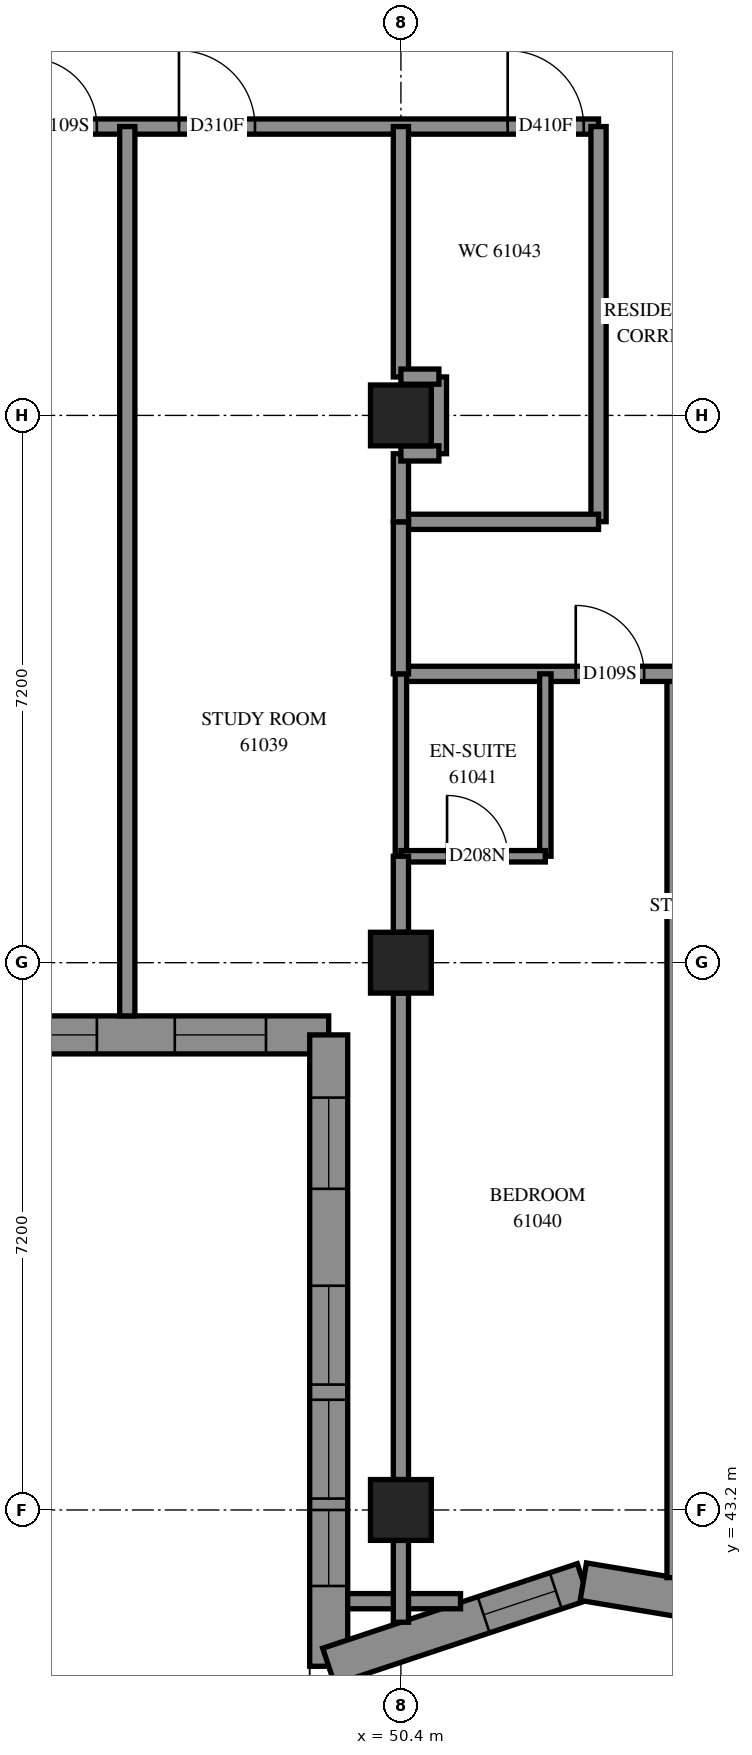
"""IFC4 building model, lengths in metres.
Left out: names, types, materials, properties, quantities, classifications, styles, units other than length and angle.
Written with IfcOpenShell. Run it as: python <this file> out.ifc"""

import sys

from ifc_helpers import new_model, si_unit, direction, frame, frame_2d, origin, origin_2d, place, context, subcontext, project, spatial, polyline, rectangle, outline, extrude, element, fill, save


model = new_model("IFC4")
c1 = context("Model", 3, precision=1e-05, world=origin(), true_north=direction((0.0, 1.0)))
c2 = subcontext(c1, "Body", "Model", "MODEL_VIEW")
j1 = project(units=[si_unit("LENGTHUNIT", "METRE"), si_unit("PLANEANGLEUNIT", "RADIAN")], contexts=[c1])
p1 = place(None, origin())
s1 = spatial("IfcSite", under=j1, at=p1, CompositionType="ELEMENT")
p2 = place(p1, origin())
s2 = spatial("IfcBuilding", under=s1, at=p2, CompositionType="ELEMENT")
p3 = place(p2, frame((0.0, 0.0, 223.6)))
s3 = spatial("IfcBuildingStorey", under=s2, at=p3, CompositionType="ELEMENT", Elevation=223.6)
for number, where, z_axis, x_axis in (
    (1, (50.4, 43.2, 0.0), (0.0, 0.0, 1.0), (1.0, 0.0, 0.0)),
    (2, (50.4, 50.4, 0.0), (0.0, 0.0, 1.0), (1.0, 0.0, 0.0)),
    (3, (50.4, 57.6, 0.0), (0.0, 0.0, 1.0), (1.0, 0.0, 0.0)),
):
    element("IfcColumn", number, at=place(p3, frame(where, z_axis=z_axis, x_axis=x_axis)), inside=s3, PredefinedType="COLUMN", context=c2, shape_type="SweptSolid", body=[
        extrude(rectangle(XDim=0.8, YDim=0.8, at=origin_2d()), origin(), (0.0, 0.0, 1.0), 3.1),
    ])
p4 = place(p3, frame((42.25, 49.45, 0.0), z_axis=(0.0, 0.0, 1.0), x_axis=(1.0, 0.0, 0.0)))
e4 = element("IfcWall", 4, at=p4, inside=s3, PredefinedType="SOLIDWALL", context=c2, shape_type="SweptSolid", body=[
    extrude(outline(polyline([(-0.25, -0.25), (6.95, -0.25), (7.45, 0.25), (0.25, 0.25), (-0.25, -0.25)])), origin(), (0.0, 0.0, 1.0), 3.1),
])
p5 = place(p4, frame((1.35, 0.0, 0.45)))
e5 = element("IfcOpeningElement", 5, at=p5, cuts=e4, PredefinedType="OPENING", context=c2, shape_type="SweptSolid", body=[
    extrude(rectangle(XDim=1.3, YDim=2.5, at=frame_2d((0.65, 1.25))), frame((0.0, 0.26, 0.0), z_axis=(0.0, -1.0, 0.0), x_axis=(1.0, 0.0, 0.0)), (0.0, 0.0, 1.0), 0.52),
])
p6 = place(p4, frame((2.85, 0.0, 0.45)))
e6 = element("IfcOpeningElement", 6, at=p6, cuts=e4, PredefinedType="OPENING", context=c2, shape_type="SweptSolid", body=[
    extrude(rectangle(XDim=1.3, YDim=2.5, at=frame_2d((0.65, 1.25))), frame((0.0, 0.26, 0.0), z_axis=(0.0, -1.0, 0.0), x_axis=(1.0, 0.0, 0.0)), (0.0, 0.0, 1.0), 0.52),
])
p7 = place(p4, frame((5.175, 0.0, 0.45)))
e7 = element("IfcOpeningElement", 7, at=p7, cuts=e4, PredefinedType="OPENING", context=c2, shape_type="SweptSolid", body=[
    extrude(rectangle(XDim=1.2, YDim=2.5, at=frame_2d((0.6, 1.25))), frame((0.0, 0.26, 0.0), z_axis=(0.0, -1.0, 0.0), x_axis=(1.0, 0.0, 0.0)), (0.0, 0.0, 1.0), 0.52),
])
p8 = place(p3, frame((49.45, 49.45, 0.0), z_axis=(0.0, 0.0, 1.0), x_axis=(0.0, -1.0, 0.0)))
e8 = element("IfcWall", 8, at=p8, inside=s3, PredefinedType="SOLIDWALL", context=c2, shape_type="SweptSolid", body=[
    extrude(outline(polyline([(0.25, -0.25), (8.653, -0.25), (7.96, 0.25), (-0.25, 0.25), (0.25, -0.25)])), origin(), (0.0, 0.0, 1.0), 3.1),
])
p9 = place(p8, frame((3.3, 0.0, 0.45)))
e9 = element("IfcOpeningElement", 9, at=p9, cuts=e8, PredefinedType="OPENING", context=c2, shape_type="SweptSolid", body=[
    extrude(rectangle(XDim=1.3, YDim=2.5, at=frame_2d((0.65, 1.25))), frame((0.0, 0.26, 0.0), z_axis=(0.0, -1.0, 0.0), x_axis=(1.0, 0.0, 0.0)), (0.0, 0.0, 1.0), 0.52),
])
p10 = place(p8, frame((4.8, 0.0, 0.45)))
e10 = element("IfcOpeningElement", 10, at=p10, cuts=e8, PredefinedType="OPENING", context=c2, shape_type="SweptSolid", body=[
    extrude(rectangle(XDim=1.3, YDim=2.5, at=frame_2d((0.65, 1.25))), frame((0.0, 0.26, 0.0), z_axis=(0.0, -1.0, 0.0), x_axis=(1.0, 0.0, 0.0)), (0.0, 0.0, 1.0), 0.52),
])
p11 = place(p8, frame((0.825, 0.0, 0.45)))
e11 = element("IfcOpeningElement", 11, at=p11, cuts=e8, PredefinedType="OPENING", context=c2, shape_type="SweptSolid", body=[
    extrude(rectangle(XDim=1.2, YDim=2.5, at=frame_2d((0.6, 1.25))), frame((0.0, 0.26, 0.0), z_axis=(0.0, -1.0, 0.0), x_axis=(1.0, 0.0, 0.0)), (0.0, 0.0, 1.0), 0.52),
])
p12 = place(p8, frame((6.25, 0.0, 0.45)))
e12 = element("IfcOpeningElement", 12, at=p12, cuts=e8, PredefinedType="OPENING", context=c2, shape_type="SweptSolid", body=[
    extrude(rectangle(XDim=1.0, YDim=2.5, at=frame_2d((0.5, 1.25))), frame((0.0, 0.26, 0.0), z_axis=(0.0, -1.0, 0.0), x_axis=(1.0, 0.0, 0.0)), (0.0, 0.0, 1.0), 0.52),
])
p13 = place(p3, frame((49.45, 41.144, 0.0), z_axis=(0.0, 0.0, 1.0), x_axis=(0.9489633816, 0.3153862716, 0.0)))
e13 = element("IfcWall", 13, at=p13, inside=s3, PredefinedType="SOLIDWALL", context=c2, shape_type="SweptSolid", body=[
    extrude(outline(polyline([(-0.346, -0.25), (3.468, -0.25), (3.592, 0.25), (0.346, 0.25), (-0.346, -0.25)])), origin(), (0.0, 0.0, 1.0), 3.1),
])
p14 = place(p13, frame((2.148, 0.0, 0.45)))
e14 = element("IfcOpeningElement", 14, at=p14, cuts=e13, PredefinedType="OPENING", context=c2, shape_type="SweptSolid", body=[
    extrude(rectangle(XDim=1.0, YDim=2.5, at=frame_2d((0.5, 1.25))), frame((0.0, 0.26, 0.0), z_axis=(0.0, -1.0, 0.0), x_axis=(1.0, 0.0, 0.0)), (0.0, 0.0, 1.0), 0.52),
])
p15 = place(p3, frame((52.8, 42.257, 0.0), z_axis=(0.0, 0.0, 1.0), x_axis=(0.986404908, -0.1643330686, 0.0)))
e15 = element("IfcWall", 15, at=p15, inside=s3, PredefinedType="SOLIDWALL", context=c2, shape_type="SweptSolid", body=[
    extrude(outline(polyline([(0.062, -0.25), (3.732, -0.25), (3.648, 0.25), (-0.062, 0.25), (0.062, -0.25)])), origin(), (0.0, 0.0, 1.0), 3.1),
])
p16 = place(p15, frame((1.733, 0.0, 0.45)))
e16 = element("IfcOpeningElement", 16, at=p16, cuts=e15, PredefinedType="OPENING", context=c2, shape_type="SweptSolid", body=[
    extrude(rectangle(XDim=1.2, YDim=2.5, at=frame_2d((0.6, 1.25))), frame((0.0, 0.26, 0.0), z_axis=(0.0, -1.0, 0.0), x_axis=(1.0, 0.0, 0.0)), (0.0, 0.0, 1.0), 0.52),
])
p17 = place(p3, frame((36.0, 61.4, 0.0), z_axis=(0.0, 0.0, 1.0), x_axis=(1.0, 0.0, 0.0)))
e17 = element("IfcWall", 17, at=p17, inside=s3, PredefinedType="PARTITIONING", context=c2, shape_type="SweptSolid", body=[
    extrude(rectangle(XDim=17.0, YDim=0.2, at=frame_2d((8.5, 0.0))), origin(), (0.0, 0.0, 1.0), 3.1),
])
p18 = place(p17, frame((2.3, 0.0, 0.0)))
e18 = element("IfcOpeningElement", 18, at=p18, cuts=e17, PredefinedType="OPENING", context=c2, shape_type="SweptSolid", body=[
    extrude(rectangle(XDim=0.9, YDim=2.1, at=frame_2d((0.45, 1.05))), frame((0.0, 0.11, 0.0), z_axis=(0.0, -1.0, 0.0), x_axis=(1.0, 0.0, 0.0)), (0.0, 0.0, 1.0), 0.22),
])
p19 = place(p17, frame((4.125, 0.0, 0.0)))
e19 = element("IfcOpeningElement", 19, at=p19, cuts=e17, PredefinedType="OPENING", context=c2, shape_type="SweptSolid", body=[
    extrude(rectangle(XDim=1.0, YDim=2.1, at=frame_2d((0.5, 1.05))), frame((0.0, 0.11, 0.0), z_axis=(0.0, -1.0, 0.0), x_axis=(1.0, 0.0, 0.0)), (0.0, 0.0, 1.0), 0.22),
])
p20 = place(p17, frame((9.5, 0.0, 0.0)))
e20 = element("IfcOpeningElement", 20, at=p20, cuts=e17, PredefinedType="OPENING", context=c2, shape_type="SweptSolid", body=[
    extrude(rectangle(XDim=0.9, YDim=2.1, at=frame_2d((0.45, 1.05))), frame((0.0, 0.11, 0.0), z_axis=(0.0, -1.0, 0.0), x_axis=(1.0, 0.0, 0.0)), (0.0, 0.0, 1.0), 0.22),
])
p21 = place(p17, frame((11.48, 0.0, 0.0)))
e21 = element("IfcOpeningElement", 21, at=p21, cuts=e17, PredefinedType="OPENING", context=c2, shape_type="SweptSolid", body=[
    extrude(rectangle(XDim=1.0, YDim=2.1, at=frame_2d((0.5, 1.05))), frame((0.0, 0.11, 0.0), z_axis=(0.0, -1.0, 0.0), x_axis=(1.0, 0.0, 0.0)), (0.0, 0.0, 1.0), 0.22),
])
p22 = place(p17, frame((15.805, 0.0, 0.0)))
e22 = element("IfcOpeningElement", 22, at=p22, cuts=e17, PredefinedType="OPENING", context=c2, shape_type="SweptSolid", body=[
    extrude(rectangle(XDim=1.0, YDim=2.1, at=frame_2d((0.5, 1.05))), frame((0.0, 0.11, 0.0), z_axis=(0.0, -1.0, 0.0), x_axis=(1.0, 0.0, 0.0)), (0.0, 0.0, 1.0), 0.22),
])
p23 = place(p3, frame((54.0, 42.31, 0.0), z_axis=(0.0, 0.0, 1.0), x_axis=(0.0, 1.0, 0.0)))
e23 = element("IfcWall", 23, at=p23, inside=s3, PredefinedType="PARTITIONING", context=c2, shape_type="SweptSolid", body=[
    extrude(rectangle(XDim=11.89, YDim=0.2, at=frame_2d((5.945, 0.0))), origin(), (0.0, 0.0, 1.0), 3.1),
])
p24 = place(p3, frame((46.8, 49.7, 0.0), z_axis=(0.0, 0.0, 1.0), x_axis=(0.0, 1.0, 0.0)))
e24 = element("IfcWall", 24, at=p24, inside=s3, PredefinedType="PARTITIONING", context=c2, shape_type="SweptSolid", body=[
    extrude(rectangle(XDim=11.7, YDim=0.2, at=frame_2d((5.85, 0.0))), origin(), (0.0, 0.0, 1.0), 3.1),
])
p25 = place(p3, frame((50.4, 43.6, 0.0), z_axis=(0.0, 0.0, 1.0), x_axis=(0.0, 1.0, 0.0)))
e25 = element("IfcWall", 25, at=p25, inside=s3, PredefinedType="PARTITIONING", context=c2, shape_type="SweptSolid", body=[
    extrude(rectangle(XDim=6.4, YDim=0.2, at=frame_2d((3.2, 0.0))), origin(), (0.0, 0.0, 1.0), 2.6),
])
p26 = place(p3, frame((53.0, 56.202, 0.0), z_axis=(0.0, 0.0, 1.0), x_axis=(0.0, 1.0, 0.0)))
e26 = element("IfcWall", 26, at=p26, inside=s3, PredefinedType="PARTITIONING", context=c2, shape_type="SweptSolid", body=[
    extrude(rectangle(XDim=5.198, YDim=0.2, at=frame_2d((2.599, 0.0))), origin(), (0.0, 0.0, 1.0), 3.1),
])
p27 = place(p3, frame((50.4, 54.2, 0.0), z_axis=(0.0, 0.0, 1.0), x_axis=(1.0, 0.0, 0.0)))
e27 = element("IfcWall", 27, at=p27, inside=s3, PredefinedType="PARTITIONING", context=c2, shape_type="SweptSolid", body=[
    extrude(rectangle(XDim=4.6, YDim=0.2, at=frame_2d((2.3, 0.0))), origin(), (0.0, 0.0, 1.0), 3.1),
])
p28 = place(p27, frame((2.3, 0.0, 0.0)))
e28 = element("IfcOpeningElement", 28, at=p28, cuts=e27, PredefinedType="OPENING", context=c2, shape_type="SweptSolid", body=[
    extrude(rectangle(XDim=0.9, YDim=2.1, at=frame_2d((0.45, 1.05))), frame((0.0, 0.11, 0.0), z_axis=(0.0, -1.0, 0.0), x_axis=(1.0, 0.0, 0.0)), (0.0, 0.0, 1.0), 0.22),
])
p29 = place(p3, frame((50.4, 58.106, 0.0), z_axis=(0.0, 0.0, 1.0), x_axis=(0.0, 1.0, 0.0)))
e29 = element("IfcWall", 29, at=p29, inside=s3, PredefinedType="PARTITIONING", context=c2, shape_type="SweptSolid", body=[
    extrude(rectangle(XDim=3.294, YDim=0.2, at=frame_2d((1.647, 0.0))), origin(), (0.0, 0.0, 1.0), 3.1),
])
p30 = place(p3, frame((50.4, 56.2, 0.0), z_axis=(0.0, 0.0, 1.0), x_axis=(1.0, 0.0, 0.0)))
e30 = element("IfcWall", 30, at=p30, inside=s3, PredefinedType="PARTITIONING", context=c2, shape_type="SweptSolid", body=[
    extrude(rectangle(XDim=2.6, YDim=0.2, at=frame_2d((1.3, 0.0))), origin(), (0.0, 0.0, 1.0), 3.1),
])
for number, where, z_axis, x_axis in (
    (31, (52.3, 51.8, 0.0), (0.0, 0.0, 1.0), (0.0, 1.0, 0.0)),
    (32, (50.4, 51.8, 0.0), (0.0, 0.0, 1.0), (0.0, 1.0, 0.0)),
):
    element("IfcWall", number, at=place(p3, frame(where, z_axis=z_axis, x_axis=x_axis)), inside=s3, PredefinedType="PARTITIONING", context=c2, shape_type="SweptSolid", body=[
        extrude(rectangle(XDim=2.4, YDim=0.15, at=frame_2d((1.2, 0.0))), origin(), (0.0, 0.0, 1.0), 3.1),
    ])
p31 = place(p3, frame((50.4, 54.2, 0.0), z_axis=(0.0, 0.0, 1.0), x_axis=(0.0, 1.0, 0.0)))
e33 = element("IfcWall", 33, at=p31, inside=s3, PredefinedType="PARTITIONING", context=c2, shape_type="SweptSolid", body=[
    extrude(rectangle(XDim=2.0, YDim=0.2, at=frame_2d((1.0, 0.0))), origin(), (0.0, 0.0, 1.0), 3.1),
])
p32 = place(p3, frame((50.4, 51.8, 0.0), z_axis=(0.0, 0.0, 1.0), x_axis=(1.0, 0.0, 0.0)))
e34 = element("IfcWall", 34, at=p32, inside=s3, PredefinedType="PARTITIONING", context=c2, shape_type="SweptSolid", body=[
    extrude(rectangle(XDim=1.9, YDim=0.15, at=frame_2d((0.95, 0.0))), origin(), (0.0, 0.0, 1.0), 3.1),
])
p33 = place(p32, frame((0.607, 0.0, 0.0)))
e35 = element("IfcOpeningElement", 35, at=p33, cuts=e34, PredefinedType="OPENING", context=c2, shape_type="SweptSolid", body=[
    extrude(rectangle(XDim=0.8, YDim=2.1, at=frame_2d((0.4, 1.05))), frame((0.0, 0.085, 0.0), z_axis=(0.0, -1.0, 0.0), x_axis=(1.0, 0.0, 0.0)), (0.0, 0.0, 1.0), 0.17),
])
p34 = place(p3, frame((49.7, 42.0, 0.0), z_axis=(0.0, 0.0, 1.0), x_axis=(1.0, 0.0, 0.0)))
e36 = element("IfcWall", 36, at=p34, inside=s3, PredefinedType="PARTITIONING", context=c2, shape_type="SweptSolid", body=[
    extrude(rectangle(XDim=1.484, YDim=0.2, at=frame_2d((0.742, 0.0))), origin(), (0.0, 0.0, 1.0), 3.1),
])
p35 = place(p3, frame((50.9, 57.096, 0.0), z_axis=(0.0, 0.0, 1.0), x_axis=(0.0, 1.0, 0.0)))
e37 = element("IfcWall", 37, at=p35, inside=s3, PredefinedType="PARTITIONING", context=c2, shape_type="SweptSolid", body=[
    extrude(rectangle(XDim=1.01, YDim=0.2, at=frame_2d((0.505, 0.0))), origin(), (0.0, 0.0, 1.0), 3.1),
])
p36 = place(p3, frame((50.4, 50.8, 0.0), z_axis=(0.0, 0.0, 1.0), x_axis=(0.0, 1.0, 0.0)))
e38 = element("IfcWall", 38, at=p36, inside=s3, PredefinedType="PARTITIONING", context=c2, shape_type="SweptSolid", body=[
    extrude(rectangle(XDim=1.0, YDim=0.2, at=frame_2d((0.5, 0.0))), origin(), (0.0, 0.0, 1.0), 3.1),
])
p37 = place(p3, frame((50.4, 56.2, 0.0), z_axis=(0.0, 0.0, 1.0), x_axis=(0.0, 1.0, 0.0)))
e39 = element("IfcWall", 39, at=p37, inside=s3, PredefinedType="PARTITIONING", context=c2, shape_type="SweptSolid", body=[
    extrude(rectangle(XDim=0.896, YDim=0.2, at=frame_2d((0.448, 0.0))), origin(), (0.0, 0.0, 1.0), 3.1),
])
p38 = place(p3, frame((50.4, 41.723, 0.0), z_axis=(0.0, 0.0, 1.0), x_axis=(0.0, 1.0, 0.0)))
e40 = element("IfcWall", 40, at=p38, inside=s3, PredefinedType="PARTITIONING", context=c2, shape_type="SweptSolid", body=[
    extrude(rectangle(XDim=1.077, YDim=0.2, at=frame_2d((0.539, 0.0))), origin(), (0.0, 0.0, 1.0), 3.1),
])
for number, where, z_axis, x_axis in (
    (41, (50.4, 58.11, 0.0), (0.0, 0.0, 1.0), (1.0, 0.0, 0.0)),
    (42, (50.4, 57.1, 0.0), (0.0, 0.0, 1.0), (1.0, 0.0, 0.0)),
):
    element("IfcWall", number, at=place(p3, frame(where, z_axis=z_axis, x_axis=x_axis)), inside=s3, PredefinedType="PARTITIONING", context=c2, shape_type="SweptSolid", body=[
        extrude(rectangle(XDim=0.5, YDim=0.2, at=frame_2d((0.25, 0.0))), origin(), (0.0, 0.0, 1.0), 3.1),
    ])
p39 = place(p6, origin())
e43 = element("IfcWindow", 43, at=p39, inside=s3, PartitioningType="SINGLE_PANEL", PredefinedType="WINDOW", context=c2, shape_type="SweptSolid", body=[
    extrude(rectangle(XDim=1.3, YDim=2.5, at=frame_2d((0.65, 1.25))), frame((0.0, 0.18, 0.0), z_axis=(0.0, -1.0, 0.0), x_axis=(1.0, 0.0, 0.0)), (0.0, 0.0, 1.0), 0.06),
])
fill(e6, e43)
p40 = place(p7, origin())
e44 = element("IfcWindow", 44, at=p40, inside=s3, PartitioningType="SINGLE_PANEL", PredefinedType="WINDOW", context=c2, shape_type="SweptSolid", body=[
    extrude(rectangle(XDim=1.2, YDim=2.5, at=frame_2d((0.6, 1.25))), frame((0.0, 0.18, 0.0), z_axis=(0.0, -1.0, 0.0), x_axis=(1.0, 0.0, 0.0)), (0.0, 0.0, 1.0), 0.06),
])
fill(e7, e44)
p41 = place(p9, origin())
e45 = element("IfcWindow", 45, at=p41, inside=s3, PartitioningType="SINGLE_PANEL", PredefinedType="WINDOW", context=c2, shape_type="SweptSolid", body=[
    extrude(rectangle(XDim=1.3, YDim=2.5, at=frame_2d((0.65, 1.25))), frame((0.0, 0.18, 0.0), z_axis=(0.0, -1.0, 0.0), x_axis=(1.0, 0.0, 0.0)), (0.0, 0.0, 1.0), 0.06),
])
fill(e9, e45)
p42 = place(p10, origin())
e46 = element("IfcWindow", 46, at=p42, inside=s3, PartitioningType="SINGLE_PANEL", PredefinedType="WINDOW", context=c2, shape_type="SweptSolid", body=[
    extrude(rectangle(XDim=1.3, YDim=2.5, at=frame_2d((0.65, 1.25))), frame((0.0, 0.18, 0.0), z_axis=(0.0, -1.0, 0.0), x_axis=(1.0, 0.0, 0.0)), (0.0, 0.0, 1.0), 0.06),
])
fill(e10, e46)
p43 = place(p11, origin())
e47 = element("IfcWindow", 47, at=p43, inside=s3, PartitioningType="SINGLE_PANEL", PredefinedType="WINDOW", context=c2, shape_type="SweptSolid", body=[
    extrude(rectangle(XDim=1.2, YDim=2.5, at=frame_2d((0.6, 1.25))), frame((0.0, 0.18, 0.0), z_axis=(0.0, -1.0, 0.0), x_axis=(1.0, 0.0, 0.0)), (0.0, 0.0, 1.0), 0.06),
])
fill(e11, e47)
p44 = place(p20, origin())
e48 = element("IfcDoor", 48, at=p44, inside=s3, OperationType="SINGLE_SWING_LEFT", PredefinedType="DOOR", context=c2, shape_type="SweptSolid", body=[
    extrude(rectangle(XDim=0.9, YDim=2.1, at=frame_2d((0.45, 1.05))), frame((0.0, 0.025, 0.0), z_axis=(0.0, -1.0, 0.0), x_axis=(1.0, 0.0, 0.0)), (0.0, 0.0, 1.0), 0.05),
])
fill(e20, e48)
p45 = place(p21, origin())
e49 = element("IfcDoor", 49, at=p45, inside=s3, OperationType="SINGLE_SWING_RIGHT", PredefinedType="DOOR", context=c2, shape_type="SweptSolid", body=[
    extrude(rectangle(XDim=1.0, YDim=2.1, at=frame_2d((0.5, 1.05))), frame((0.0, 0.025, 0.0), z_axis=(0.0, -1.0, 0.0), x_axis=(1.0, 0.0, 0.0)), (0.0, 0.0, 1.0), 0.05),
])
fill(e21, e49)
p46 = place(p28, origin())
e50 = element("IfcDoor", 50, at=p46, inside=s3, OperationType="SINGLE_SWING_LEFT", PredefinedType="DOOR", context=c2, shape_type="SweptSolid", body=[
    extrude(rectangle(XDim=0.9, YDim=2.1, at=frame_2d((0.45, 1.05))), frame((0.0, 0.025, 0.0), z_axis=(0.0, -1.0, 0.0), x_axis=(1.0, 0.0, 0.0)), (0.0, 0.0, 1.0), 0.05),
])
fill(e28, e50)
p47 = place(p33, origin())
e51 = element("IfcDoor", 51, at=p47, inside=s3, OperationType="SINGLE_SWING_RIGHT", PredefinedType="DOOR", context=c2, shape_type="SweptSolid", body=[
    extrude(rectangle(XDim=0.8, YDim=2.1, at=frame_2d((0.4, 1.05))), frame((0.0, 0.025, 0.0), z_axis=(0.0, -1.0, 0.0), x_axis=(1.0, 0.0, 0.0)), (0.0, 0.0, 1.0), 0.05),
])
fill(e35, e51)
p48 = place(p22, origin())
e52 = element("IfcDoor", 52, at=p48, inside=s3, OperationType="SINGLE_SWING_LEFT", PredefinedType="DOOR", context=c2, shape_type="SweptSolid", body=[
    extrude(rectangle(XDim=1.0, YDim=2.1, at=frame_2d((0.5, 1.05))), frame((0.0, 0.025, 0.0), z_axis=(0.0, -1.0, 0.0), x_axis=(1.0, 0.0, 0.0)), (0.0, 0.0, 1.0), 0.05),
])
fill(e22, e52)
p49 = place(p12, origin())
e53 = element("IfcWindow", 53, at=p49, inside=s3, PartitioningType="SINGLE_PANEL", PredefinedType="WINDOW", context=c2, shape_type="SweptSolid", body=[
    extrude(rectangle(XDim=1.0, YDim=2.5, at=frame_2d((0.5, 1.25))), frame((0.0, 0.18, 0.0), z_axis=(0.0, -1.0, 0.0), x_axis=(1.0, 0.0, 0.0)), (0.0, 0.0, 1.0), 0.06),
])
fill(e12, e53)
p50 = place(p14, origin())
e54 = element("IfcWindow", 54, at=p50, inside=s3, PartitioningType="SINGLE_PANEL", PredefinedType="WINDOW", context=c2, shape_type="SweptSolid", body=[
    extrude(rectangle(XDim=1.0, YDim=2.5, at=frame_2d((0.5, 1.25))), frame((0.0, 0.18, 0.0), z_axis=(0.0, -1.0, 0.0), x_axis=(1.0, 0.0, 0.0)), (0.0, 0.0, 1.0), 0.06),
])
fill(e14, e54)
save(model, sys.argv[1])
